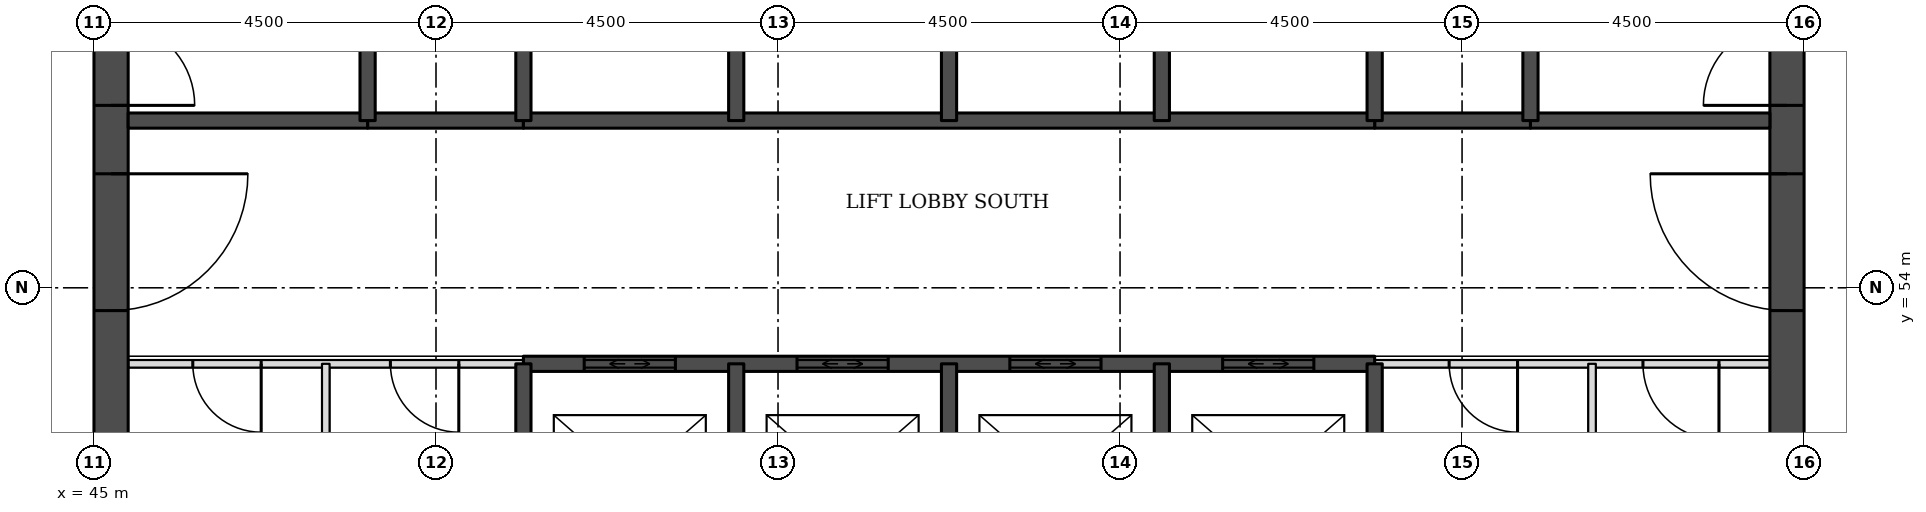
"""IFC4 building model, lengths in metres.
Left out: names, types, materials, properties, quantities, classifications, styles, units other than length and angle.
Written with IfcOpenShell. Run it as: python <this file> out.ifc"""

import sys

from ifc_helpers import new_model, si_unit, direction, frame, frame_2d, origin, place, context, subcontext, project, spatial, rectangle, extrude, element, fill, save


model = new_model("IFC4")
c1 = context("Model", 3, precision=1e-05, world=origin(), true_north=direction((0.0, 1.0)))
c2 = subcontext(c1, "Body", "Model", "MODEL_VIEW")
j1 = project(units=[si_unit("LENGTHUNIT", "METRE"), si_unit("PLANEANGLEUNIT", "RADIAN")], contexts=[c1])
p1 = place(None, origin())
s1 = spatial("IfcSite", under=j1, at=p1, CompositionType="ELEMENT")
p2 = place(p1, origin())
s2 = spatial("IfcBuilding", under=s1, at=p2, CompositionType="ELEMENT")
p3 = place(p2, frame((0.0, 0.0, 134.4)))
s3 = spatial("IfcBuildingStorey", under=s2, at=p3, CompositionType="ELEMENT", Elevation=134.4)
p4 = place(p3, frame((45.225, 49.5, 0.0), z_axis=(0.0, 0.0, 1.0), x_axis=(0.0, 1.0, 0.0)))
e1 = element("IfcWall", 1, at=p4, inside=s3, PredefinedType="SHEAR", context=c2, shape_type="SweptSolid", body=[
    extrude(rectangle(XDim=22.5, YDim=0.45, at=frame_2d((11.25, 0.0))), origin(), (0.0, 0.0, 1.0), 3.7),
])
p5 = place(p4, frame((4.2, 0.0, 0.0)))
e2 = element("IfcOpeningElement", 2, at=p5, cuts=e1, PredefinedType="OPENING", context=c2, shape_type="SweptSolid", body=[
    extrude(rectangle(XDim=1.8, YDim=2.1, at=frame_2d((0.9, 1.05))), frame((0.0, 0.235, 0.0), z_axis=(0.0, -1.0, 0.0), x_axis=(1.0, 0.0, 0.0)), (0.0, 0.0, 1.0), 0.47),
])
p6 = place(p4, frame((6.9, 0.0, 0.0)))
e3 = element("IfcOpeningElement", 3, at=p6, cuts=e1, PredefinedType="OPENING", context=c2, shape_type="SweptSolid", body=[
    extrude(rectangle(XDim=1.1, YDim=2.1, at=frame_2d((0.55, 1.05))), frame((0.0, 0.235, 0.0), z_axis=(0.0, -1.0, 0.0), x_axis=(1.0, 0.0, 0.0)), (0.0, 0.0, 1.0), 0.47),
])
p7 = place(p4, frame((13.6, 0.0, 0.0)))
e4 = element("IfcOpeningElement", 4, at=p7, cuts=e1, PredefinedType="OPENING", context=c2, shape_type="SweptSolid", body=[
    extrude(rectangle(XDim=1.1, YDim=2.1, at=frame_2d((0.55, 1.05))), frame((0.0, 0.235, 0.0), z_axis=(0.0, -1.0, 0.0), x_axis=(1.0, 0.0, 0.0)), (0.0, 0.0, 1.0), 0.47),
])
p8 = place(p4, frame((16.5, 0.0, 0.0)))
e5 = element("IfcOpeningElement", 5, at=p8, cuts=e1, PredefinedType="OPENING", context=c2, shape_type="SweptSolid", body=[
    extrude(rectangle(XDim=1.8, YDim=2.1, at=frame_2d((0.9, 1.05))), frame((0.0, 0.235, 0.0), z_axis=(0.0, -1.0, 0.0), x_axis=(1.0, 0.0, 0.0)), (0.0, 0.0, 1.0), 0.47),
])
p9 = place(p3, frame((67.275, 49.5, 0.0), z_axis=(0.0, 0.0, 1.0), x_axis=(0.0, 1.0, 0.0)))
e6 = element("IfcWall", 6, at=p9, inside=s3, PredefinedType="SHEAR", context=c2, shape_type="SweptSolid", body=[
    extrude(rectangle(XDim=22.5, YDim=0.45, at=frame_2d((11.25, 0.0))), origin(), (0.0, 0.0, 1.0), 3.7),
])
p10 = place(p9, frame((4.2, 0.0, 0.0)))
e7 = element("IfcOpeningElement", 7, at=p10, cuts=e6, PredefinedType="OPENING", context=c2, shape_type="SweptSolid", body=[
    extrude(rectangle(XDim=1.8, YDim=2.1, at=frame_2d((0.9, 1.05))), frame((0.0, 0.235, 0.0), z_axis=(0.0, -1.0, 0.0), x_axis=(1.0, 0.0, 0.0)), (0.0, 0.0, 1.0), 0.47),
])
p11 = place(p9, frame((6.9, 0.0, 0.0)))
e8 = element("IfcOpeningElement", 8, at=p11, cuts=e6, PredefinedType="OPENING", context=c2, shape_type="SweptSolid", body=[
    extrude(rectangle(XDim=1.1, YDim=2.1, at=frame_2d((0.55, 1.05))), frame((0.0, 0.235, 0.0), z_axis=(0.0, -1.0, 0.0), x_axis=(1.0, 0.0, 0.0)), (0.0, 0.0, 1.0), 0.47),
])
p12 = place(p9, frame((13.6, 0.0, 0.0)))
e9 = element("IfcOpeningElement", 9, at=p12, cuts=e6, PredefinedType="OPENING", context=c2, shape_type="SweptSolid", body=[
    extrude(rectangle(XDim=1.1, YDim=2.1, at=frame_2d((0.55, 1.05))), frame((0.0, 0.235, 0.0), z_axis=(0.0, -1.0, 0.0), x_axis=(1.0, 0.0, 0.0)), (0.0, 0.0, 1.0), 0.47),
])
p13 = place(p9, frame((16.5, 0.0, 0.0)))
e10 = element("IfcOpeningElement", 10, at=p13, cuts=e6, PredefinedType="OPENING", context=c2, shape_type="SweptSolid", body=[
    extrude(rectangle(XDim=1.8, YDim=2.1, at=frame_2d((0.9, 1.05))), frame((0.0, 0.235, 0.0), z_axis=(0.0, -1.0, 0.0), x_axis=(1.0, 0.0, 0.0)), (0.0, 0.0, 1.0), 0.47),
])
p14 = place(p3, frame((45.45, 53.0, 0.0), z_axis=(0.0, 0.0, 1.0), x_axis=(1.0, 0.0, 0.0)))
e11 = element("IfcWall", 11, at=p14, inside=s3, PredefinedType="PARTITIONING", context=c2, shape_type="SweptSolid", body=[
    extrude(rectangle(XDim=5.2, YDim=0.1, at=frame_2d((2.6, 0.0))), origin(), (0.0, 0.0, 1.0), 3.55),
])
p15 = place(p14, frame((0.85, 0.0, 0.0)))
e12 = element("IfcOpeningElement", 12, at=p15, cuts=e11, PredefinedType="OPENING", context=c2, shape_type="SweptSolid", body=[
    extrude(rectangle(XDim=0.9, YDim=2.1, at=frame_2d((0.45, 1.05))), frame((0.0, 0.06, 0.0), z_axis=(0.0, -1.0, 0.0), x_axis=(1.0, 0.0, 0.0)), (0.0, 0.0, 1.0), 0.12),
])
p16 = place(p14, frame((3.45, 0.0, 0.0)))
e13 = element("IfcOpeningElement", 13, at=p16, cuts=e11, PredefinedType="OPENING", context=c2, shape_type="SweptSolid", body=[
    extrude(rectangle(XDim=0.9, YDim=2.1, at=frame_2d((0.45, 1.05))), frame((0.0, 0.06, 0.0), z_axis=(0.0, -1.0, 0.0), x_axis=(1.0, 0.0, 0.0)), (0.0, 0.0, 1.0), 0.12),
])
p17 = place(p3, frame((61.85, 53.0, 0.0), z_axis=(0.0, 0.0, 1.0), x_axis=(1.0, 0.0, 0.0)))
e14 = element("IfcWall", 14, at=p17, inside=s3, PredefinedType="PARTITIONING", context=c2, shape_type="SweptSolid", body=[
    extrude(rectangle(XDim=5.2, YDim=0.1, at=frame_2d((2.6, 0.0))), origin(), (0.0, 0.0, 1.0), 3.55),
])
p18 = place(p17, frame((3.53, 0.0, 0.0)))
e15 = element("IfcOpeningElement", 15, at=p18, cuts=e14, PredefinedType="OPENING", context=c2, shape_type="SweptSolid", body=[
    extrude(rectangle(XDim=1.0, YDim=2.1, at=frame_2d((0.5, 1.05))), frame((0.0, 0.06, 0.0), z_axis=(0.0, -1.0, 0.0), x_axis=(1.0, 0.0, 0.0)), (0.0, 0.0, 1.0), 0.12),
])
p19 = place(p17, frame((0.98, 0.0, 0.0)))
e16 = element("IfcOpeningElement", 16, at=p19, cuts=e14, PredefinedType="OPENING", context=c2, shape_type="SweptSolid", body=[
    extrude(rectangle(XDim=0.9, YDim=2.1, at=frame_2d((0.45, 1.05))), frame((0.0, 0.06, 0.0), z_axis=(0.0, -1.0, 0.0), x_axis=(1.0, 0.0, 0.0)), (0.0, 0.0, 1.0), 0.12),
])
p20 = place(p3, frame((50.65, 53.0, 0.0), z_axis=(0.0, 0.0, 1.0), x_axis=(1.0, 0.0, 0.0)))
e17 = element("IfcWall", 17, at=p20, inside=s3, PredefinedType="SOLIDWALL", context=c2, shape_type="SweptSolid", body=[
    extrude(rectangle(XDim=11.2, YDim=0.2, at=frame_2d((5.6, 0.0))), origin(), (0.0, 0.0, 1.0), 3.55),
])
p21 = place(p20, frame((0.8, 0.0, 0.0)))
e18 = element("IfcOpeningElement", 18, at=p21, cuts=e17, PredefinedType="OPENING", context=c2, shape_type="SweptSolid", body=[
    extrude(rectangle(XDim=1.2, YDim=2.1, at=frame_2d((0.6, 1.05))), frame((0.0, 0.11, 0.0), z_axis=(0.0, -1.0, 0.0), x_axis=(1.0, 0.0, 0.0)), (0.0, 0.0, 1.0), 0.22),
])
p22 = place(p20, frame((3.6, 0.0, 0.0)))
e19 = element("IfcOpeningElement", 19, at=p22, cuts=e17, PredefinedType="OPENING", context=c2, shape_type="SweptSolid", body=[
    extrude(rectangle(XDim=1.2, YDim=2.1, at=frame_2d((0.6, 1.05))), frame((0.0, 0.11, 0.0), z_axis=(0.0, -1.0, 0.0), x_axis=(1.0, 0.0, 0.0)), (0.0, 0.0, 1.0), 0.22),
])
p23 = place(p20, frame((6.4, 0.0, 0.0)))
e20 = element("IfcOpeningElement", 20, at=p23, cuts=e17, PredefinedType="OPENING", context=c2, shape_type="SweptSolid", body=[
    extrude(rectangle(XDim=1.2, YDim=2.1, at=frame_2d((0.6, 1.05))), frame((0.0, 0.11, 0.0), z_axis=(0.0, -1.0, 0.0), x_axis=(1.0, 0.0, 0.0)), (0.0, 0.0, 1.0), 0.22),
])
p24 = place(p20, frame((9.2, 0.0, 0.0)))
e21 = element("IfcOpeningElement", 21, at=p24, cuts=e17, PredefinedType="OPENING", context=c2, shape_type="SweptSolid", body=[
    extrude(rectangle(XDim=1.2, YDim=2.1, at=frame_2d((0.6, 1.05))), frame((0.0, 0.11, 0.0), z_axis=(0.0, -1.0, 0.0), x_axis=(1.0, 0.0, 0.0)), (0.0, 0.0, 1.0), 0.22),
])
for number, where, z_axis, x_axis in (
    (22, (48.6, 56.2, 0.0), (0.0, 0.0, 1.0), (1.0, 0.0, 0.0)),
    (23, (61.85, 56.2, 0.0), (0.0, 0.0, 1.0), (1.0, 0.0, 0.0)),
):
    element("IfcWall", number, at=place(p3, frame(where, z_axis=z_axis, x_axis=x_axis)), inside=s3, PredefinedType="SOLIDWALL", context=c2, shape_type="SweptSolid", body=[
        extrude(rectangle(XDim=2.05, YDim=0.2, at=frame_2d((1.025, 0.0))), origin(), (0.0, 0.0, 1.0), 3.55),
    ])
p25 = place(p3, frame((45.45, 56.2, 0.0), z_axis=(0.0, 0.0, 1.0), x_axis=(1.0, 0.0, 0.0)))
e24 = element("IfcWall", 24, at=p25, inside=s3, PredefinedType="SOLIDWALL", context=c2, shape_type="SweptSolid", body=[
    extrude(rectangle(XDim=3.15, YDim=0.2, at=frame_2d((1.575, 0.0))), origin(), (0.0, 0.0, 1.0), 3.55),
])
p26 = place(p3, frame((50.65, 56.2, 0.0), z_axis=(0.0, 0.0, 1.0), x_axis=(1.0, 0.0, 0.0)))
e25 = element("IfcWall", 25, at=p26, inside=s3, PredefinedType="SOLIDWALL", context=c2, shape_type="SweptSolid", body=[
    extrude(rectangle(XDim=11.2, YDim=0.2, at=frame_2d((5.6, 0.0))), origin(), (0.0, 0.0, 1.0), 3.55),
])
p27 = place(p3, frame((63.9, 56.2, 0.0), z_axis=(0.0, 0.0, 1.0), x_axis=(1.0, 0.0, 0.0)))
e26 = element("IfcWall", 26, at=p27, inside=s3, PredefinedType="SOLIDWALL", context=c2, shape_type="SweptSolid", body=[
    extrude(rectangle(XDim=3.15, YDim=0.2, at=frame_2d((1.575, 0.0))), origin(), (0.0, 0.0, 1.0), 3.55),
])
p28 = place(p3, frame((48.05, 49.95, 0.0), z_axis=(0.0, 0.0, 1.0), x_axis=(0.0, 1.0, 0.0)))
e27 = element("IfcWall", 27, at=p28, inside=s3, PredefinedType="PARTITIONING", context=c2, shape_type="SweptSolid", body=[
    extrude(rectangle(XDim=3.05, YDim=0.1, at=frame_2d((1.525, 0.0))), origin(), (0.0, 0.0, 1.0), 3.55),
])
p29 = place(p3, frame((48.6, 56.2, 0.0), z_axis=(0.0, 0.0, 1.0), x_axis=(0.0, 1.0, 0.0)))
e28 = element("IfcWall", 28, at=p29, inside=s3, PredefinedType="SOLIDWALL", context=c2, shape_type="SweptSolid", body=[
    extrude(rectangle(XDim=5.8, YDim=0.2, at=frame_2d((2.9, 0.0))), origin(), (0.0, 0.0, 1.0), 3.55),
])
p30 = place(p3, frame((50.65, 49.95, 0.0), z_axis=(0.0, 0.0, 1.0), x_axis=(0.0, 1.0, 0.0)))
e29 = element("IfcWall", 29, at=p30, inside=s3, PredefinedType="SOLIDWALL", context=c2, shape_type="SweptSolid", body=[
    extrude(rectangle(XDim=3.05, YDim=0.2, at=frame_2d((1.525, 0.0))), origin(), (0.0, 0.0, 1.0), 3.55),
])
p31 = place(p3, frame((50.65, 56.2, 0.0), z_axis=(0.0, 0.0, 1.0), x_axis=(0.0, 1.0, 0.0)))
e30 = element("IfcWall", 30, at=p31, inside=s3, PredefinedType="SOLIDWALL", context=c2, shape_type="SweptSolid", body=[
    extrude(rectangle(XDim=2.8, YDim=0.2, at=frame_2d((1.4, 0.0))), origin(), (0.0, 0.0, 1.0), 3.55),
])
p32 = place(p3, frame((53.45, 49.95, 0.0), z_axis=(0.0, 0.0, 1.0), x_axis=(0.0, 1.0, 0.0)))
e31 = element("IfcWall", 31, at=p32, inside=s3, PredefinedType="SOLIDWALL", context=c2, shape_type="SweptSolid", body=[
    extrude(rectangle(XDim=3.05, YDim=0.2, at=frame_2d((1.525, 0.0))), origin(), (0.0, 0.0, 1.0), 3.55),
])
p33 = place(p3, frame((53.45, 56.2, 0.0), z_axis=(0.0, 0.0, 1.0), x_axis=(0.0, 1.0, 0.0)))
e32 = element("IfcWall", 32, at=p33, inside=s3, PredefinedType="SOLIDWALL", context=c2, shape_type="SweptSolid", body=[
    extrude(rectangle(XDim=2.8, YDim=0.2, at=frame_2d((1.4, 0.0))), origin(), (0.0, 0.0, 1.0), 3.55),
])
p34 = place(p3, frame((56.25, 49.95, 0.0), z_axis=(0.0, 0.0, 1.0), x_axis=(0.0, 1.0, 0.0)))
e33 = element("IfcWall", 33, at=p34, inside=s3, PredefinedType="SOLIDWALL", context=c2, shape_type="SweptSolid", body=[
    extrude(rectangle(XDim=3.05, YDim=0.2, at=frame_2d((1.525, 0.0))), origin(), (0.0, 0.0, 1.0), 3.55),
])
p35 = place(p3, frame((56.25, 56.2, 0.0), z_axis=(0.0, 0.0, 1.0), x_axis=(0.0, 1.0, 0.0)))
e34 = element("IfcWall", 34, at=p35, inside=s3, PredefinedType="SOLIDWALL", context=c2, shape_type="SweptSolid", body=[
    extrude(rectangle(XDim=2.8, YDim=0.2, at=frame_2d((1.4, 0.0))), origin(), (0.0, 0.0, 1.0), 3.55),
])
p36 = place(p3, frame((59.05, 49.95, 0.0), z_axis=(0.0, 0.0, 1.0), x_axis=(0.0, 1.0, 0.0)))
e35 = element("IfcWall", 35, at=p36, inside=s3, PredefinedType="SOLIDWALL", context=c2, shape_type="SweptSolid", body=[
    extrude(rectangle(XDim=3.05, YDim=0.2, at=frame_2d((1.525, 0.0))), origin(), (0.0, 0.0, 1.0), 3.55),
])
p37 = place(p3, frame((59.05, 56.2, 0.0), z_axis=(0.0, 0.0, 1.0), x_axis=(0.0, 1.0, 0.0)))
e36 = element("IfcWall", 36, at=p37, inside=s3, PredefinedType="SOLIDWALL", context=c2, shape_type="SweptSolid", body=[
    extrude(rectangle(XDim=2.8, YDim=0.2, at=frame_2d((1.4, 0.0))), origin(), (0.0, 0.0, 1.0), 3.55),
])
p38 = place(p3, frame((61.85, 49.95, 0.0), z_axis=(0.0, 0.0, 1.0), x_axis=(0.0, 1.0, 0.0)))
e37 = element("IfcWall", 37, at=p38, inside=s3, PredefinedType="SOLIDWALL", context=c2, shape_type="SweptSolid", body=[
    extrude(rectangle(XDim=3.05, YDim=0.2, at=frame_2d((1.525, 0.0))), origin(), (0.0, 0.0, 1.0), 3.55),
])
p39 = place(p3, frame((61.85, 56.2, 0.0), z_axis=(0.0, 0.0, 1.0), x_axis=(0.0, 1.0, 0.0)))
e38 = element("IfcWall", 38, at=p39, inside=s3, PredefinedType="SOLIDWALL", context=c2, shape_type="SweptSolid", body=[
    extrude(rectangle(XDim=2.8, YDim=0.2, at=frame_2d((1.4, 0.0))), origin(), (0.0, 0.0, 1.0), 3.55),
])
p40 = place(p3, frame((63.9, 56.2, 0.0), z_axis=(0.0, 0.0, 1.0), x_axis=(0.0, 1.0, 0.0)))
e39 = element("IfcWall", 39, at=p40, inside=s3, PredefinedType="SOLIDWALL", context=c2, shape_type="SweptSolid", body=[
    extrude(rectangle(XDim=5.8, YDim=0.2, at=frame_2d((2.9, 0.0))), origin(), (0.0, 0.0, 1.0), 3.55),
])
p41 = place(p3, frame((64.71, 49.95, 0.0), z_axis=(0.0, 0.0, 1.0), x_axis=(0.0, 1.0, 0.0)))
e40 = element("IfcWall", 40, at=p41, inside=s3, PredefinedType="PARTITIONING", context=c2, shape_type="SweptSolid", body=[
    extrude(rectangle(XDim=3.05, YDim=0.1, at=frame_2d((1.525, 0.0))), origin(), (0.0, 0.0, 1.0), 3.55),
])
p42 = place(p21, origin())
e41 = element("IfcDoor", 41, at=p42, inside=s3, OperationType="DOUBLE_DOOR_SLIDING", PredefinedType="DOOR", context=c2, shape_type="SweptSolid", body=[
    extrude(rectangle(XDim=1.2, YDim=2.1, at=frame_2d((0.6, 1.05))), frame((0.0, 0.025, 0.0), z_axis=(0.0, -1.0, 0.0), x_axis=(1.0, 0.0, 0.0)), (0.0, 0.0, 1.0), 0.05),
])
fill(e18, e41)
p43 = place(p22, origin())
e42 = element("IfcDoor", 42, at=p43, inside=s3, OperationType="DOUBLE_DOOR_SLIDING", PredefinedType="DOOR", context=c2, shape_type="SweptSolid", body=[
    extrude(rectangle(XDim=1.2, YDim=2.1, at=frame_2d((0.6, 1.05))), frame((0.0, 0.025, 0.0), z_axis=(0.0, -1.0, 0.0), x_axis=(1.0, 0.0, 0.0)), (0.0, 0.0, 1.0), 0.05),
])
fill(e19, e42)
p44 = place(p23, origin())
e43 = element("IfcDoor", 43, at=p44, inside=s3, OperationType="DOUBLE_DOOR_SLIDING", PredefinedType="DOOR", context=c2, shape_type="SweptSolid", body=[
    extrude(rectangle(XDim=1.2, YDim=2.1, at=frame_2d((0.6, 1.05))), frame((0.0, 0.025, 0.0), z_axis=(0.0, -1.0, 0.0), x_axis=(1.0, 0.0, 0.0)), (0.0, 0.0, 1.0), 0.05),
])
fill(e20, e43)
p45 = place(p24, origin())
e44 = element("IfcDoor", 44, at=p45, inside=s3, OperationType="DOUBLE_DOOR_SLIDING", PredefinedType="DOOR", context=c2, shape_type="SweptSolid", body=[
    extrude(rectangle(XDim=1.2, YDim=2.1, at=frame_2d((0.6, 1.05))), frame((0.0, 0.025, 0.0), z_axis=(0.0, -1.0, 0.0), x_axis=(1.0, 0.0, 0.0)), (0.0, 0.0, 1.0), 0.05),
])
fill(e21, e44)
p46 = place(p5, frame((1.8, 0.0, 0.0), z_axis=(0.0, 0.0, 1.0), x_axis=(-1.0, 0.0, 0.0)))
e45 = element("IfcDoor", 45, at=p46, inside=s3, OperationType="SINGLE_SWING_LEFT", PredefinedType="DOOR", context=c2, shape_type="SweptSolid", body=[
    extrude(rectangle(XDim=1.8, YDim=2.1, at=frame_2d((0.9, 1.05))), frame((0.0, 0.025, 0.0), z_axis=(0.0, -1.0, 0.0), x_axis=(1.0, 0.0, 0.0)), (0.0, 0.0, 1.0), 0.05),
])
fill(e2, e45)
p47 = place(p6, frame((1.1, 0.0, 0.0), z_axis=(0.0, 0.0, 1.0), x_axis=(-1.0, 0.0, 0.0)))
e46 = element("IfcDoor", 46, at=p47, inside=s3, OperationType="SINGLE_SWING_RIGHT", PredefinedType="DOOR", context=c2, shape_type="SweptSolid", body=[
    extrude(rectangle(XDim=1.1, YDim=2.1, at=frame_2d((0.55, 1.05))), frame((0.0, 0.025, 0.0), z_axis=(0.0, -1.0, 0.0), x_axis=(1.0, 0.0, 0.0)), (0.0, 0.0, 1.0), 0.05),
])
fill(e3, e46)
p48 = place(p10, origin())
e47 = element("IfcDoor", 47, at=p48, inside=s3, OperationType="SINGLE_SWING_RIGHT", PredefinedType="DOOR", context=c2, shape_type="SweptSolid", body=[
    extrude(rectangle(XDim=1.8, YDim=2.1, at=frame_2d((0.9, 1.05))), frame((0.0, 0.025, 0.0), z_axis=(0.0, -1.0, 0.0), x_axis=(1.0, 0.0, 0.0)), (0.0, 0.0, 1.0), 0.05),
])
fill(e7, e47)
p49 = place(p11, origin())
e48 = element("IfcDoor", 48, at=p49, inside=s3, OperationType="SINGLE_SWING_LEFT", PredefinedType="DOOR", context=c2, shape_type="SweptSolid", body=[
    extrude(rectangle(XDim=1.1, YDim=2.1, at=frame_2d((0.55, 1.05))), frame((0.0, 0.025, 0.0), z_axis=(0.0, -1.0, 0.0), x_axis=(1.0, 0.0, 0.0)), (0.0, 0.0, 1.0), 0.05),
])
fill(e8, e48)
p50 = place(p18, frame((1.0, 0.0, 0.0), z_axis=(0.0, 0.0, 1.0), x_axis=(-1.0, 0.0, 0.0)))
e49 = element("IfcDoor", 49, at=p50, inside=s3, OperationType="SINGLE_SWING_LEFT", PredefinedType="DOOR", context=c2, shape_type="SweptSolid", body=[
    extrude(rectangle(XDim=1.0, YDim=2.1, at=frame_2d((0.5, 1.05))), frame((0.0, 0.025, 0.0), z_axis=(0.0, -1.0, 0.0), x_axis=(1.0, 0.0, 0.0)), (0.0, 0.0, 1.0), 0.05),
])
fill(e15, e49)
p51 = place(p19, frame((0.9, 0.0, 0.0), z_axis=(0.0, 0.0, 1.0), x_axis=(-1.0, 0.0, 0.0)))
e50 = element("IfcDoor", 50, at=p51, inside=s3, OperationType="SINGLE_SWING_LEFT", PredefinedType="DOOR", context=c2, shape_type="SweptSolid", body=[
    extrude(rectangle(XDim=0.9, YDim=2.1, at=frame_2d((0.45, 1.05))), frame((0.0, 0.025, 0.0), z_axis=(0.0, -1.0, 0.0), x_axis=(1.0, 0.0, 0.0)), (0.0, 0.0, 1.0), 0.05),
])
fill(e16, e50)
p52 = place(p15, frame((0.9, 0.0, 0.0), z_axis=(0.0, 0.0, 1.0), x_axis=(-1.0, 0.0, 0.0)))
e51 = element("IfcDoor", 51, at=p52, inside=s3, OperationType="SINGLE_SWING_LEFT", PredefinedType="DOOR", context=c2, shape_type="SweptSolid", body=[
    extrude(rectangle(XDim=0.9, YDim=2.1, at=frame_2d((0.45, 1.05))), frame((0.0, 0.025, 0.0), z_axis=(0.0, -1.0, 0.0), x_axis=(1.0, 0.0, 0.0)), (0.0, 0.0, 1.0), 0.05),
])
fill(e12, e51)
p53 = place(p16, frame((0.9, 0.0, 0.0), z_axis=(0.0, 0.0, 1.0), x_axis=(-1.0, 0.0, 0.0)))
e52 = element("IfcDoor", 52, at=p53, inside=s3, OperationType="SINGLE_SWING_LEFT", PredefinedType="DOOR", context=c2, shape_type="SweptSolid", body=[
    extrude(rectangle(XDim=0.9, YDim=2.1, at=frame_2d((0.45, 1.05))), frame((0.0, 0.025, 0.0), z_axis=(0.0, -1.0, 0.0), x_axis=(1.0, 0.0, 0.0)), (0.0, 0.0, 1.0), 0.05),
])
fill(e13, e52)
save(model, sys.argv[1])
